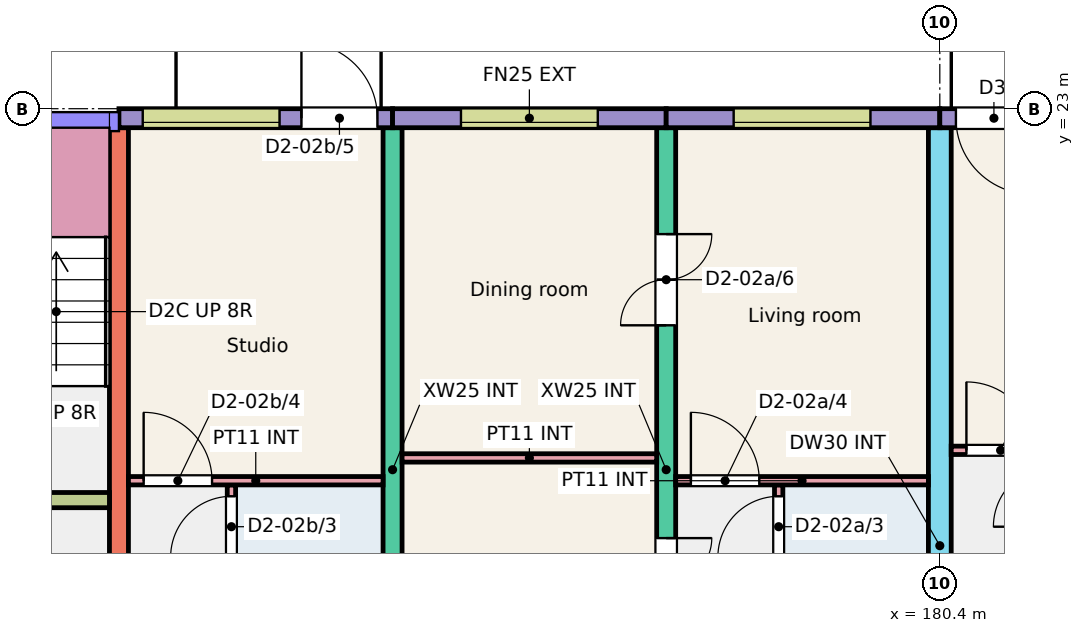
"""IFC4 building model, lengths in metres.
Left out: names, types, materials, properties, quantities, classifications, styles, units other than length and angle.
Written with IfcOpenShell. Run it as: python <this file> out.ifc"""

import sys

from ifc_helpers import new_model, si_unit, direction, frame, frame_2d, origin, place, context, subcontext, project, spatial, rectangle, extrude, element, fill, save


model = new_model("IFC4")
c1 = context("Model", 3, precision=1e-05, world=origin(), true_north=direction((0.0, 1.0)))
c2 = subcontext(c1, "Body", "Model", "MODEL_VIEW")
j1 = project(units=[si_unit("LENGTHUNIT", "METRE"), si_unit("PLANEANGLEUNIT", "RADIAN")], contexts=[c1])
p1 = place(None, origin())
s1 = spatial("IfcSite", under=j1, at=p1, CompositionType="ELEMENT")
p2 = place(p1, origin())
s2 = spatial("IfcBuilding", under=s1, at=p2, CompositionType="ELEMENT")
p3 = place(p2, frame((0.0, 0.0, 6.0)))
s3 = spatial("IfcBuildingStorey", under=s2, at=p3, CompositionType="ELEMENT", Elevation=6.0)
for number, where, z_axis, x_axis in (
    (1, (169.6, 13.75, 0.0), (0.0, 0.0, 1.0), (0.0, 1.0, 0.0)),
    (2, (173.2, 13.75, 0.0), (0.0, 0.0, 1.0), (0.0, 1.0, 0.0)),
):
    element("IfcWall", number, at=place(p3, frame(where, z_axis=z_axis, x_axis=x_axis)), inside=s3, PredefinedType="SHEAR", context=c2, shape_type="SweptSolid", body=[
        extrude(rectangle(XDim=9.0, YDim=0.25, at=frame_2d((4.5, 0.0))), origin(), (0.0, 0.0, 1.0), 3.0),
    ])
p4 = place(p3, frame((176.8, 13.75, 0.0), z_axis=(0.0, 0.0, 1.0), x_axis=(0.0, 1.0, 0.0)))
e3 = element("IfcWall", 3, at=p4, inside=s3, PredefinedType="SHEAR", context=c2, shape_type="SweptSolid", body=[
    extrude(rectangle(XDim=9.0, YDim=0.25, at=frame_2d((4.5, 0.0))), origin(), (0.0, 0.0, 1.0), 3.0),
])
p5 = place(p4, frame((2.4, 0.0, 0.0)))
e4 = element("IfcOpeningElement", 4, at=p5, cuts=e3, PredefinedType="OPENING", context=c2, shape_type="SweptSolid", body=[
    extrude(rectangle(XDim=1.2, YDim=2.1, at=frame_2d((0.6, 1.05))), frame((0.0, 0.135, 0.0), z_axis=(0.0, -1.0, 0.0), x_axis=(1.0, 0.0, 0.0)), (0.0, 0.0, 1.0), 0.27),
])
p6 = place(p4, frame((6.4, 0.0, 0.0)))
e5 = element("IfcOpeningElement", 5, at=p6, cuts=e3, PredefinedType="OPENING", context=c2, shape_type="SweptSolid", body=[
    extrude(rectangle(XDim=1.2, YDim=2.1, at=frame_2d((0.6, 1.05))), frame((0.0, 0.135, 0.0), z_axis=(0.0, -1.0, 0.0), x_axis=(1.0, 0.0, 0.0)), (0.0, 0.0, 1.0), 0.27),
])
p7 = place(p3, frame((180.4, 11.75, 0.0), z_axis=(0.0, 0.0, 1.0), x_axis=(0.0, 1.0, 0.0)))
e6 = element("IfcWall", 6, at=p7, inside=s3, PredefinedType="SHEAR", context=c2, shape_type="SweptSolid", body=[
    extrude(rectangle(XDim=11.0, YDim=0.3, at=frame_2d((5.5, 0.0))), origin(), (0.0, 0.0, 1.0), 3.0),
])
p8 = place(p7, frame((0.3, 0.0, 0.0)))
e7 = element("IfcOpeningElement", 7, at=p8, cuts=e6, PredefinedType="OPENING", context=c2, shape_type="SweptSolid", body=[
    extrude(rectangle(XDim=1.2, YDim=2.1, at=frame_2d((0.6, 1.05))), frame((0.0, 0.16, 0.0), z_axis=(0.0, -1.0, 0.0), x_axis=(1.0, 0.0, 0.0)), (0.0, 0.0, 1.0), 0.32),
])
p9 = place(p3, frame((163.75, 17.85, 0.0), z_axis=(0.0, 0.0, 1.0), x_axis=(1.0, 0.0, 0.0)))
e8 = element("IfcWall", 8, at=p9, inside=s3, PredefinedType="SHEAR", context=c2, shape_type="SweptSolid", body=[
    extrude(rectangle(XDim=5.725, YDim=0.2, at=frame_2d((2.863, 0.0))), origin(), (0.0, 0.0, 1.0), 3.0),
])
p10 = place(p9, frame((3.775, 0.0, 0.0)))
e9 = element("IfcOpeningElement", 9, at=p10, cuts=e8, PredefinedType="OPENING", context=c2, shape_type="SweptSolid", body=[
    extrude(rectangle(XDim=1.0, YDim=2.1, at=frame_2d((0.5, 1.05))), frame((0.0, 0.11, 0.0), z_axis=(0.0, -1.0, 0.0), x_axis=(1.0, 0.0, 0.0)), (0.0, 0.0, 1.0), 0.22),
])
p11 = place(p9, frame((0.762, 0.0, 0.0)))
e10 = element("IfcOpeningElement", 10, at=p11, cuts=e8, PredefinedType="OPENING", context=c2, shape_type="SweptSolid", body=[
    extrude(rectangle(XDim=1.1, YDim=2.1, at=frame_2d((0.55, 1.05))), frame((0.0, 0.11, 0.0), z_axis=(0.0, -1.0, 0.0), x_axis=(1.0, 0.0, 0.0)), (0.0, 0.0, 1.0), 0.22),
])
p12 = place(p3, frame((169.6, 22.875, 0.0), z_axis=(0.0, 0.0, 1.0), x_axis=(1.0, 0.0, 0.0)))
e11 = element("IfcWall", 11, at=p12, inside=s3, PredefinedType="SOLIDWALL", context=c2, shape_type="SweptSolid", body=[
    extrude(rectangle(XDim=3.6, YDim=0.25, at=frame_2d((1.8, 0.0))), origin(), (0.0, 0.0, 1.0), 3.0),
])
p13 = place(p12, frame((0.313, 0.0, 1.1)))
e12 = element("IfcOpeningElement", 12, at=p13, cuts=e11, PredefinedType="OPENING", context=c2, shape_type="SweptSolid", body=[
    extrude(rectangle(XDim=1.8, YDim=1.3, at=frame_2d((0.9, 0.65))), frame((0.0, 0.135, 0.0), z_axis=(0.0, -1.0, 0.0), x_axis=(1.0, 0.0, 0.0)), (0.0, 0.0, 1.0), 0.27),
])
p14 = place(p12, frame((2.401, 0.0, 0.0)))
e13 = element("IfcOpeningElement", 13, at=p14, cuts=e11, PredefinedType="OPENING", context=c2, shape_type="SweptSolid", body=[
    extrude(rectangle(XDim=1.0, YDim=2.1, at=frame_2d((0.5, 1.05))), frame((0.0, 0.135, 0.0), z_axis=(0.0, -1.0, 0.0), x_axis=(1.0, 0.0, 0.0)), (0.0, 0.0, 1.0), 0.27),
])
p15 = place(p3, frame((173.2, 22.875, 0.0), z_axis=(0.0, 0.0, 1.0), x_axis=(1.0, 0.0, 0.0)))
e14 = element("IfcWall", 14, at=p15, inside=s3, PredefinedType="SOLIDWALL", context=c2, shape_type="SweptSolid", body=[
    extrude(rectangle(XDim=3.6, YDim=0.25, at=frame_2d((1.8, 0.0))), origin(), (0.0, 0.0, 1.0), 3.0),
])
p16 = place(p15, frame((0.9, 0.0, 1.1)))
e15 = element("IfcOpeningElement", 15, at=p16, cuts=e14, PredefinedType="OPENING", context=c2, shape_type="SweptSolid", body=[
    extrude(rectangle(XDim=1.8, YDim=1.3, at=frame_2d((0.9, 0.65))), frame((0.0, 0.135, 0.0), z_axis=(0.0, -1.0, 0.0), x_axis=(1.0, 0.0, 0.0)), (0.0, 0.0, 1.0), 0.27),
])
p17 = place(p3, frame((176.8, 22.875, 0.0), z_axis=(0.0, 0.0, 1.0), x_axis=(1.0, 0.0, 0.0)))
e16 = element("IfcWall", 16, at=p17, inside=s3, PredefinedType="SOLIDWALL", context=c2, shape_type="SweptSolid", body=[
    extrude(rectangle(XDim=3.6, YDim=0.25, at=frame_2d((1.8, 0.0))), origin(), (0.0, 0.0, 1.0), 3.0),
])
p18 = place(p17, frame((0.887, 0.0, 1.1)))
e17 = element("IfcOpeningElement", 17, at=p18, cuts=e16, PredefinedType="OPENING", context=c2, shape_type="SweptSolid", body=[
    extrude(rectangle(XDim=1.8, YDim=1.3, at=frame_2d((0.9, 0.65))), frame((0.0, 0.135, 0.0), z_axis=(0.0, -1.0, 0.0), x_axis=(1.0, 0.0, 0.0)), (0.0, 0.0, 1.0), 0.27),
])
p19 = place(p3, frame((180.4, 22.875, 0.0), z_axis=(0.0, 0.0, 1.0), x_axis=(1.0, 0.0, 0.0)))
e18 = element("IfcWall", 18, at=p19, inside=s3, PredefinedType="SOLIDWALL", context=c2, shape_type="SweptSolid", body=[
    extrude(rectangle(XDim=3.6, YDim=0.25, at=frame_2d((1.8, 0.0))), origin(), (0.0, 0.0, 1.0), 3.0),
])
p20 = place(p19, frame((1.493, 0.0, 1.1)))
e19 = element("IfcOpeningElement", 19, at=p20, cuts=e18, PredefinedType="OPENING", context=c2, shape_type="SweptSolid", body=[
    extrude(rectangle(XDim=1.8, YDim=1.3, at=frame_2d((0.9, 0.65))), frame((0.0, 0.135, 0.0), z_axis=(0.0, -1.0, 0.0), x_axis=(1.0, 0.0, 0.0)), (0.0, 0.0, 1.0), 0.27),
])
p21 = place(p19, frame((0.212, 0.0, 0.0)))
e20 = element("IfcOpeningElement", 20, at=p21, cuts=e18, PredefinedType="OPENING", context=c2, shape_type="SweptSolid", body=[
    extrude(rectangle(XDim=1.0, YDim=2.1, at=frame_2d((0.5, 1.05))), frame((0.0, 0.135, 0.0), z_axis=(0.0, -1.0, 0.0), x_axis=(1.0, 0.0, 0.0)), (0.0, 0.0, 1.0), 0.27),
])
p22 = place(p3, frame((178.28, 13.75, 0.0), z_axis=(0.0, 0.0, 1.0), x_axis=(0.0, 1.0, 0.0)))
e21 = element("IfcWall", 21, at=p22, inside=s3, PredefinedType="PARTITIONING", context=c2, shape_type="SweptSolid", body=[
    extrude(rectangle(XDim=4.3, YDim=0.11, at=frame_2d((2.15, 0.0))), origin(), (0.0, 0.0, 1.0), 2.8),
])
p23 = place(p22, frame((0.2, 0.0, 0.0)))
e22 = element("IfcOpeningElement", 22, at=p23, cuts=e21, PredefinedType="OPENING", context=c2, shape_type="SweptSolid", body=[
    extrude(rectangle(XDim=0.8, YDim=2.1, at=frame_2d((0.4, 1.05))), frame((0.0, 0.065, 0.0), z_axis=(0.0, -1.0, 0.0), x_axis=(1.0, 0.0, 0.0)), (0.0, 0.0, 1.0), 0.13),
])
p24 = place(p22, frame((3.35, 0.0, 0.0)))
e23 = element("IfcOpeningElement", 23, at=p24, cuts=e21, PredefinedType="OPENING", context=c2, shape_type="SweptSolid", body=[
    extrude(rectangle(XDim=0.8, YDim=2.1, at=frame_2d((0.4, 1.05))), frame((0.0, 0.065, 0.0), z_axis=(0.0, -1.0, 0.0), x_axis=(1.0, 0.0, 0.0)), (0.0, 0.0, 1.0), 0.13),
])
p25 = place(p3, frame((176.925, 18.105, 0.0), z_axis=(0.0, 0.0, 1.0), x_axis=(1.0, 0.0, 0.0)))
e24 = element("IfcWall", 24, at=p25, inside=s3, PredefinedType="PARTITIONING", context=c2, shape_type="SweptSolid", body=[
    extrude(rectangle(XDim=3.325, YDim=0.11, at=frame_2d((1.663, 0.0))), origin(), (0.0, 0.0, 1.0), 2.8),
])
p26 = place(p25, frame((0.2, 0.0, 0.0)))
e25 = element("IfcOpeningElement", 25, at=p26, cuts=e24, PredefinedType="OPENING", context=c2, shape_type="SweptSolid", body=[
    extrude(rectangle(XDim=0.9, YDim=2.1, at=frame_2d((0.45, 1.05))), frame((0.0, 0.065, 0.0), z_axis=(0.0, -1.0, 0.0), x_axis=(1.0, 0.0, 0.0)), (0.0, 0.0, 1.0), 0.13),
])
p27 = place(p3, frame((173.325, 18.405, 0.0), z_axis=(0.0, 0.0, 1.0), x_axis=(1.0, 0.0, 0.0)))
e26 = element("IfcWall", 26, at=p27, inside=s3, PredefinedType="PARTITIONING", context=c2, shape_type="SweptSolid", body=[
    extrude(rectangle(XDim=3.35, YDim=0.11, at=frame_2d((1.675, 0.0))), origin(), (0.0, 0.0, 1.0), 2.8),
])
p28 = place(p3, frame((171.08, 13.75, 0.0), z_axis=(0.0, 0.0, 1.0), x_axis=(0.0, 1.0, 0.0)))
e27 = element("IfcWall", 27, at=p28, inside=s3, PredefinedType="PARTITIONING", context=c2, shape_type="SweptSolid", body=[
    extrude(rectangle(XDim=4.3, YDim=0.11, at=frame_2d((2.15, 0.0))), origin(), (0.0, 0.0, 1.0), 2.8),
])
p29 = place(p28, frame((0.2, 0.0, 0.0)))
e28 = element("IfcOpeningElement", 28, at=p29, cuts=e27, PredefinedType="OPENING", context=c2, shape_type="SweptSolid", body=[
    extrude(rectangle(XDim=0.8, YDim=2.1, at=frame_2d((0.4, 1.05))), frame((0.0, 0.065, 0.0), z_axis=(0.0, -1.0, 0.0), x_axis=(1.0, 0.0, 0.0)), (0.0, 0.0, 1.0), 0.13),
])
p30 = place(p28, frame((3.35, 0.0, 0.0)))
e29 = element("IfcOpeningElement", 29, at=p30, cuts=e27, PredefinedType="OPENING", context=c2, shape_type="SweptSolid", body=[
    extrude(rectangle(XDim=0.8, YDim=2.1, at=frame_2d((0.4, 1.05))), frame((0.0, 0.065, 0.0), z_axis=(0.0, -1.0, 0.0), x_axis=(1.0, 0.0, 0.0)), (0.0, 0.0, 1.0), 0.13),
])
p31 = place(p3, frame((169.725, 18.105, 0.0), z_axis=(0.0, 0.0, 1.0), x_axis=(1.0, 0.0, 0.0)))
e30 = element("IfcWall", 30, at=p31, inside=s3, PredefinedType="PARTITIONING", context=c2, shape_type="SweptSolid", body=[
    extrude(rectangle(XDim=3.35, YDim=0.11, at=frame_2d((1.675, 0.0))), origin(), (0.0, 0.0, 1.0), 2.8),
])
p32 = place(p31, frame((0.2, 0.0, 0.0)))
e31 = element("IfcOpeningElement", 31, at=p32, cuts=e30, PredefinedType="OPENING", context=c2, shape_type="SweptSolid", body=[
    extrude(rectangle(XDim=0.9, YDim=2.1, at=frame_2d((0.45, 1.05))), frame((0.0, 0.065, 0.0), z_axis=(0.0, -1.0, 0.0), x_axis=(1.0, 0.0, 0.0)), (0.0, 0.0, 1.0), 0.13),
])
p33 = place(p3, frame((180.55, 18.505, 0.0), z_axis=(0.0, 0.0, 1.0), x_axis=(1.0, 0.0, 0.0)))
e32 = element("IfcWall", 32, at=p33, inside=s3, PredefinedType="PARTITIONING", context=c2, shape_type="SweptSolid", body=[
    extrude(rectangle(XDim=3.325, YDim=0.11, at=frame_2d((1.663, 0.0))), origin(), (0.0, 0.0, 1.0), 2.8),
])
p34 = place(p33, frame((0.2, 0.0, 0.0)))
e33 = element("IfcOpeningElement", 33, at=p34, cuts=e32, PredefinedType="OPENING", context=c2, shape_type="SweptSolid", body=[
    extrude(rectangle(XDim=0.9, YDim=2.1, at=frame_2d((0.45, 1.05))), frame((0.0, 0.065, 0.0), z_axis=(0.0, -1.0, 0.0), x_axis=(1.0, 0.0, 0.0)), (0.0, 0.0, 1.0), 0.13),
])
p35 = place(p16, origin())
e34 = element("IfcWindow", 34, at=p35, inside=s3, PartitioningType="SINGLE_PANEL", PredefinedType="WINDOW", context=c2, shape_type="SweptSolid", body=[
    extrude(rectangle(XDim=1.8, YDim=1.3, at=frame_2d((0.9, 0.65))), frame((0.0, -0.025, 0.0), z_axis=(0.0, -1.0, 0.0), x_axis=(1.0, 0.0, 0.0)), (0.0, 0.0, 1.0), 0.06),
])
fill(e15, e34)
p36 = place(p18, origin())
e35 = element("IfcWindow", 35, at=p36, inside=s3, PartitioningType="SINGLE_PANEL", PredefinedType="WINDOW", context=c2, shape_type="SweptSolid", body=[
    extrude(rectangle(XDim=1.8, YDim=1.3, at=frame_2d((0.9, 0.65))), frame((0.0, -0.025, 0.0), z_axis=(0.0, -1.0, 0.0), x_axis=(1.0, 0.0, 0.0)), (0.0, 0.0, 1.0), 0.06),
])
fill(e17, e35)
p37 = place(p13, origin())
e36 = element("IfcWindow", 36, at=p37, inside=s3, PartitioningType="SINGLE_PANEL", PredefinedType="WINDOW", context=c2, shape_type="SweptSolid", body=[
    extrude(rectangle(XDim=1.8, YDim=1.3, at=frame_2d((0.9, 0.65))), frame((0.0, -0.025, 0.0), z_axis=(0.0, -1.0, 0.0), x_axis=(1.0, 0.0, 0.0)), (0.0, 0.0, 1.0), 0.06),
])
fill(e12, e36)
p38 = place(p24, origin())
e37 = element("IfcDoor", 37, at=p38, inside=s3, OperationType="SINGLE_SWING_LEFT", PredefinedType="DOOR", context=c2, shape_type="SweptSolid", body=[
    extrude(rectangle(XDim=0.8, YDim=2.1, at=frame_2d((0.4, 1.05))), frame((0.0, 0.025, 0.0), z_axis=(0.0, -1.0, 0.0), x_axis=(1.0, 0.0, 0.0)), (0.0, 0.0, 1.0), 0.05),
])
fill(e23, e37)
p39 = place(p26, origin())
e38 = element("IfcDoor", 38, at=p39, inside=s3, OperationType="SINGLE_SWING_LEFT", PredefinedType="DOOR", context=c2, shape_type="SweptSolid", body=[
    extrude(rectangle(XDim=0.9, YDim=2.1, at=frame_2d((0.45, 1.05))), frame((0.0, 0.025, 0.0), z_axis=(0.0, -1.0, 0.0), x_axis=(1.0, 0.0, 0.0)), (0.0, 0.0, 1.0), 0.05),
])
fill(e25, e38)
p40 = place(p5, origin())
e39 = element("IfcDoor", 39, at=p40, inside=s3, OperationType="DOUBLE_DOOR_SINGLE_SWING", PredefinedType="DOOR", context=c2, shape_type="SweptSolid", body=[
    extrude(rectangle(XDim=1.2, YDim=2.1, at=frame_2d((0.6, 1.05))), frame((0.0, 0.025, 0.0), z_axis=(0.0, -1.0, 0.0), x_axis=(1.0, 0.0, 0.0)), (0.0, 0.0, 1.0), 0.05),
])
fill(e4, e39)
p41 = place(p6, origin())
e40 = element("IfcDoor", 40, at=p41, inside=s3, OperationType="DOUBLE_DOOR_SINGLE_SWING", PredefinedType="DOOR", context=c2, shape_type="SweptSolid", body=[
    extrude(rectangle(XDim=1.2, YDim=2.1, at=frame_2d((0.6, 1.05))), frame((0.0, 0.025, 0.0), z_axis=(0.0, -1.0, 0.0), x_axis=(1.0, 0.0, 0.0)), (0.0, 0.0, 1.0), 0.05),
])
fill(e5, e40)
p42 = place(p30, origin())
e41 = element("IfcDoor", 41, at=p42, inside=s3, OperationType="SINGLE_SWING_LEFT", PredefinedType="DOOR", context=c2, shape_type="SweptSolid", body=[
    extrude(rectangle(XDim=0.8, YDim=2.1, at=frame_2d((0.4, 1.05))), frame((0.0, 0.025, 0.0), z_axis=(0.0, -1.0, 0.0), x_axis=(1.0, 0.0, 0.0)), (0.0, 0.0, 1.0), 0.05),
])
fill(e29, e41)
p43 = place(p32, origin())
e42 = element("IfcDoor", 42, at=p43, inside=s3, OperationType="SINGLE_SWING_LEFT", PredefinedType="DOOR", context=c2, shape_type="SweptSolid", body=[
    extrude(rectangle(XDim=0.9, YDim=2.1, at=frame_2d((0.45, 1.05))), frame((0.0, 0.025, 0.0), z_axis=(0.0, -1.0, 0.0), x_axis=(1.0, 0.0, 0.0)), (0.0, 0.0, 1.0), 0.05),
])
fill(e31, e42)
p44 = place(p14, origin())
e43 = element("IfcDoor", 43, at=p44, inside=s3, OperationType="SINGLE_SWING_LEFT", PredefinedType="DOOR", context=c2, shape_type="SweptSolid", body=[
    extrude(rectangle(XDim=1.0, YDim=2.1, at=frame_2d((0.5, 1.05))), frame((0.0, 0.025, 0.0), z_axis=(0.0, -1.0, 0.0), x_axis=(1.0, 0.0, 0.0)), (0.0, 0.0, 1.0), 0.05),
])
fill(e13, e43)
p45 = place(p34, origin())
e44 = element("IfcDoor", 44, at=p45, inside=s3, OperationType="SINGLE_SWING_LEFT", PredefinedType="DOOR", context=c2, shape_type="SweptSolid", body=[
    extrude(rectangle(XDim=0.9, YDim=2.1, at=frame_2d((0.45, 1.05))), frame((0.0, 0.025, 0.0), z_axis=(0.0, -1.0, 0.0), x_axis=(1.0, 0.0, 0.0)), (0.0, 0.0, 1.0), 0.05),
])
fill(e33, e44)
p46 = place(p21, origin())
e45 = element("IfcDoor", 45, at=p46, inside=s3, OperationType="SINGLE_SWING_RIGHT", PredefinedType="DOOR", context=c2, shape_type="SweptSolid", body=[
    extrude(rectangle(XDim=1.0, YDim=2.1, at=frame_2d((0.5, 1.05))), frame((0.0, 0.025, 0.0), z_axis=(0.0, -1.0, 0.0), x_axis=(1.0, 0.0, 0.0)), (0.0, 0.0, 1.0), 0.05),
])
fill(e20, e45)
save(model, sys.argv[1])
